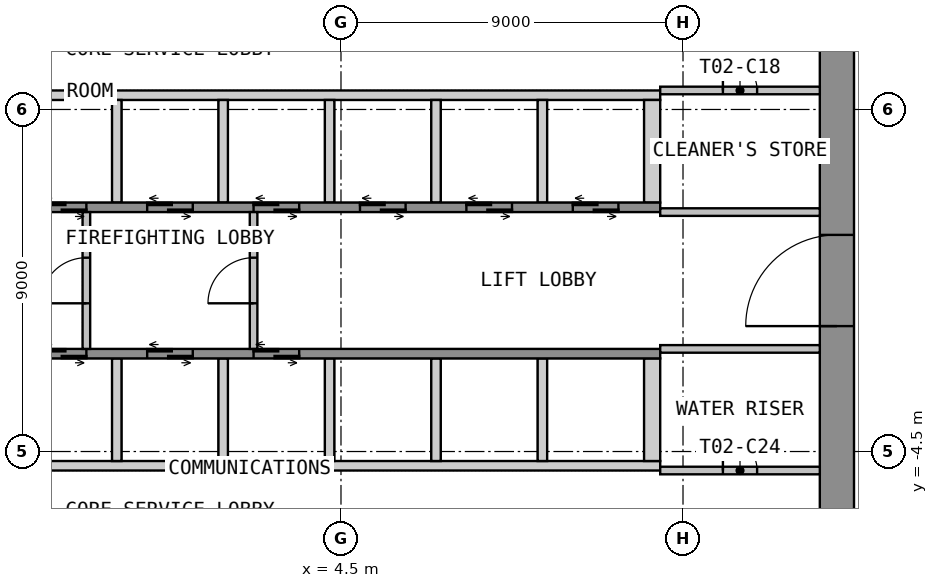
"""IFC4 building model, lengths in metres.
Left out: names, types, materials, properties, quantities, classifications, styles, units other than length and angle.
Written with IfcOpenShell. Run it as: python <this file> out.ifc"""

import sys

from ifc_helpers import new_model, si_unit, direction, frame, frame_2d, origin, place, context, subcontext, project, spatial, polyline, rectangle, outline, extrude, element, fill, save


model = new_model("IFC4")
c1 = context("Model", 3, precision=1e-05, world=origin(), true_north=direction((0.0, 1.0)))
c2 = subcontext(c1, "Body", "Model", "MODEL_VIEW")
j1 = project(units=[si_unit("LENGTHUNIT", "METRE"), si_unit("PLANEANGLEUNIT", "RADIAN")], contexts=[c1])
p1 = place(None, origin())
s1 = spatial("IfcSite", under=j1, at=p1, CompositionType="ELEMENT")
p2 = place(p1, origin())
s2 = spatial("IfcBuilding", under=s1, at=p2, CompositionType="ELEMENT")
p3 = place(p2, frame((0.0, 0.0, 41.7)))
s3 = spatial("IfcBuildingStorey", under=s2, at=p3, CompositionType="ELEMENT", Elevation=41.7)
p4 = place(p3, frame((17.55, -12.6, 0.0), z_axis=(0.0, 0.0, 1.0), x_axis=(0.0, 1.0, 0.0)))
e1 = element("IfcWall", 1, at=p4, inside=s3, PredefinedType="SHEAR", context=c2, shape_type="SweptSolid", body=[
    extrude(rectangle(XDim=25.2, YDim=0.9, at=frame_2d((12.6, 0.0))), origin(), (0.0, 0.0, 1.0), 3.525),
])
p5 = place(p4, frame((11.4, 0.0, 0.0)))
e2 = element("IfcOpeningElement", 2, at=p5, cuts=e1, PredefinedType="OPENING", context=c2, shape_type="SweptSolid", body=[
    extrude(rectangle(XDim=2.4, YDim=2.1, at=frame_2d((1.2, 1.05))), frame((0.0, 0.46, 0.0), z_axis=(0.0, -1.0, 0.0), x_axis=(1.0, 0.0, 0.0)), (0.0, 0.0, 1.0), 0.92),
])
p6 = place(p3, origin())
e3 = element("IfcWall", 3, at=p6, inside=s3, PredefinedType="SHEAR", context=c2, shape_type="SweptSolid", body=[
    extrude(outline(polyline([(-12.9, 4.75), (12.9, 4.75), (12.9, 5.0), (-12.9, 5.0), (-12.9, 4.75)])), origin(), (0.0, 0.0, 1.0), 3.525),
])
p7 = place(p3, origin())
e4 = element("IfcWall", 4, at=p7, inside=s3, PredefinedType="SHEAR", context=c2, shape_type="SweptSolid", body=[
    extrude(outline(polyline([(-1.525, 2.05), (-1.275, 2.05), (-1.275, 4.75), (-1.525, 4.75), (-1.525, 2.05)])), origin(), (0.0, 0.0, 1.0), 3.525),
])
p8 = place(p3, origin())
e5 = element("IfcWall", 5, at=p8, inside=s3, PredefinedType="SHEAR", context=c2, shape_type="SweptSolid", body=[
    extrude(outline(polyline([(1.275, 2.05), (1.525, 2.05), (1.525, 4.75), (1.275, 4.75), (1.275, 2.05)])), origin(), (0.0, 0.0, 1.0), 3.525),
])
p9 = place(p3, origin())
e6 = element("IfcWall", 6, at=p9, inside=s3, PredefinedType="SHEAR", context=c2, shape_type="SweptSolid", body=[
    extrude(outline(polyline([(4.075, 2.05), (4.325, 2.05), (4.325, 4.75), (4.075, 4.75), (4.075, 2.05)])), origin(), (0.0, 0.0, 1.0), 3.525),
])
p10 = place(p3, origin())
e7 = element("IfcWall", 7, at=p10, inside=s3, PredefinedType="SHEAR", context=c2, shape_type="SweptSolid", body=[
    extrude(outline(polyline([(6.875, 2.05), (7.125, 2.05), (7.125, 4.75), (6.875, 4.75), (6.875, 2.05)])), origin(), (0.0, 0.0, 1.0), 3.525),
])
p11 = place(p3, origin())
e8 = element("IfcWall", 8, at=p11, inside=s3, PredefinedType="SHEAR", context=c2, shape_type="SweptSolid", body=[
    extrude(outline(polyline([(9.675, 2.05), (9.925, 2.05), (9.925, 4.75), (9.675, 4.75), (9.675, 2.05)])), origin(), (0.0, 0.0, 1.0), 3.525),
])
p12 = place(p3, origin())
e9 = element("IfcWall", 9, at=p12, inside=s3, PredefinedType="SHEAR", context=c2, shape_type="SweptSolid", body=[
    extrude(outline(polyline([(12.475, 2.05), (12.9, 2.05), (12.9, 4.75), (12.475, 4.75), (12.475, 2.05)])), origin(), (0.0, 0.0, 1.0), 3.525),
])
p13 = place(p3, frame((-12.9, 1.925, 0.0), z_axis=(0.0, 0.0, 1.0), x_axis=(1.0, 0.0, 0.0)))
e10 = element("IfcWall", 10, at=p13, inside=s3, PredefinedType="SHEAR", context=c2, shape_type="SweptSolid", body=[
    extrude(rectangle(XDim=25.8, YDim=0.25, at=frame_2d((12.9, 0.0))), origin(), (0.0, 0.0, 1.0), 3.525),
])
p14 = place(p13, frame((9.5, 0.0, 0.0)))
e11 = element("IfcOpeningElement", 11, at=p14, cuts=e10, PredefinedType="OPENING", context=c2, shape_type="SweptSolid", body=[
    extrude(rectangle(XDim=1.2, YDim=2.1, at=frame_2d((0.6, 1.05))), frame((0.0, 0.135, 0.0), z_axis=(0.0, -1.0, 0.0), x_axis=(1.0, 0.0, 0.0)), (0.0, 0.0, 1.0), 0.27),
])
p15 = place(p13, frame((12.3, 0.0, 0.0)))
e12 = element("IfcOpeningElement", 12, at=p15, cuts=e10, PredefinedType="OPENING", context=c2, shape_type="SweptSolid", body=[
    extrude(rectangle(XDim=1.2, YDim=2.1, at=frame_2d((0.6, 1.05))), frame((0.0, 0.135, 0.0), z_axis=(0.0, -1.0, 0.0), x_axis=(1.0, 0.0, 0.0)), (0.0, 0.0, 1.0), 0.27),
])
p16 = place(p13, frame((15.1, 0.0, 0.0)))
e13 = element("IfcOpeningElement", 13, at=p16, cuts=e10, PredefinedType="OPENING", context=c2, shape_type="SweptSolid", body=[
    extrude(rectangle(XDim=1.2, YDim=2.1, at=frame_2d((0.6, 1.05))), frame((0.0, 0.135, 0.0), z_axis=(0.0, -1.0, 0.0), x_axis=(1.0, 0.0, 0.0)), (0.0, 0.0, 1.0), 0.27),
])
p17 = place(p13, frame((17.9, 0.0, 0.0)))
e14 = element("IfcOpeningElement", 14, at=p17, cuts=e10, PredefinedType="OPENING", context=c2, shape_type="SweptSolid", body=[
    extrude(rectangle(XDim=1.2, YDim=2.1, at=frame_2d((0.6, 1.05))), frame((0.0, 0.135, 0.0), z_axis=(0.0, -1.0, 0.0), x_axis=(1.0, 0.0, 0.0)), (0.0, 0.0, 1.0), 0.27),
])
p18 = place(p13, frame((20.7, 0.0, 0.0)))
e15 = element("IfcOpeningElement", 15, at=p18, cuts=e10, PredefinedType="OPENING", context=c2, shape_type="SweptSolid", body=[
    extrude(rectangle(XDim=1.2, YDim=2.1, at=frame_2d((0.6, 1.05))), frame((0.0, 0.135, 0.0), z_axis=(0.0, -1.0, 0.0), x_axis=(1.0, 0.0, 0.0)), (0.0, 0.0, 1.0), 0.27),
])
p19 = place(p13, frame((23.5, 0.0, 0.0)))
e16 = element("IfcOpeningElement", 16, at=p19, cuts=e10, PredefinedType="OPENING", context=c2, shape_type="SweptSolid", body=[
    extrude(rectangle(XDim=1.2, YDim=2.1, at=frame_2d((0.6, 1.05))), frame((0.0, 0.135, 0.0), z_axis=(0.0, -1.0, 0.0), x_axis=(1.0, 0.0, 0.0)), (0.0, 0.0, 1.0), 0.27),
])
p20 = place(p3, origin())
e17 = element("IfcWall", 17, at=p20, inside=s3, PredefinedType="SHEAR", context=c2, shape_type="SweptSolid", body=[
    extrude(outline(polyline([(-12.9, -5.0), (12.9, -5.0), (12.9, -4.75), (-12.9, -4.75), (-12.9, -5.0)])), origin(), (0.0, 0.0, 1.0), 3.525),
])
p21 = place(p3, origin())
e18 = element("IfcWall", 18, at=p21, inside=s3, PredefinedType="SHEAR", context=c2, shape_type="SweptSolid", body=[
    extrude(outline(polyline([(-1.525, -4.75), (-1.275, -4.75), (-1.275, -2.05), (-1.525, -2.05), (-1.525, -4.75)])), origin(), (0.0, 0.0, 1.0), 3.525),
])
p22 = place(p3, origin())
e19 = element("IfcWall", 19, at=p22, inside=s3, PredefinedType="SHEAR", context=c2, shape_type="SweptSolid", body=[
    extrude(outline(polyline([(1.275, -4.75), (1.525, -4.75), (1.525, -2.05), (1.275, -2.05), (1.275, -4.75)])), origin(), (0.0, 0.0, 1.0), 3.525),
])
p23 = place(p3, origin())
e20 = element("IfcWall", 20, at=p23, inside=s3, PredefinedType="SHEAR", context=c2, shape_type="SweptSolid", body=[
    extrude(outline(polyline([(4.075, -4.75), (4.325, -4.75), (4.325, -2.05), (4.075, -2.05), (4.075, -4.75)])), origin(), (0.0, 0.0, 1.0), 3.525),
])
p24 = place(p3, origin())
e21 = element("IfcWall", 21, at=p24, inside=s3, PredefinedType="SHEAR", context=c2, shape_type="SweptSolid", body=[
    extrude(outline(polyline([(6.875, -4.75), (7.125, -4.75), (7.125, -2.05), (6.875, -2.05), (6.875, -4.75)])), origin(), (0.0, 0.0, 1.0), 3.525),
])
p25 = place(p3, origin())
e22 = element("IfcWall", 22, at=p25, inside=s3, PredefinedType="SHEAR", context=c2, shape_type="SweptSolid", body=[
    extrude(outline(polyline([(9.675, -4.75), (9.925, -4.75), (9.925, -2.05), (9.675, -2.05), (9.675, -4.75)])), origin(), (0.0, 0.0, 1.0), 3.525),
])
p26 = place(p3, origin())
e23 = element("IfcWall", 23, at=p26, inside=s3, PredefinedType="SHEAR", context=c2, shape_type="SweptSolid", body=[
    extrude(outline(polyline([(12.475, -4.75), (12.9, -4.75), (12.9, -2.05), (12.475, -2.05), (12.475, -4.75)])), origin(), (0.0, 0.0, 1.0), 3.525),
])
p27 = place(p3, frame((-12.9, -1.925, 0.0), z_axis=(0.0, 0.0, 1.0), x_axis=(1.0, 0.0, 0.0)))
e24 = element("IfcWall", 24, at=p27, inside=s3, PredefinedType="SHEAR", context=c2, shape_type="SweptSolid", body=[
    extrude(rectangle(XDim=25.8, YDim=0.25, at=frame_2d((12.9, 0.0))), origin(), (0.0, 0.0, 1.0), 3.525),
])
p28 = place(p27, frame((1.1, 0.0, 0.0)))
e25 = element("IfcOpeningElement", 25, at=p28, cuts=e24, PredefinedType="OPENING", context=c2, shape_type="SweptSolid", body=[
    extrude(rectangle(XDim=1.2, YDim=2.1, at=frame_2d((0.6, 1.05))), frame((0.0, 0.135, 0.0), z_axis=(0.0, -1.0, 0.0), x_axis=(1.0, 0.0, 0.0)), (0.0, 0.0, 1.0), 0.27),
])
p29 = place(p27, frame((3.9, 0.0, 0.0)))
e26 = element("IfcOpeningElement", 26, at=p29, cuts=e24, PredefinedType="OPENING", context=c2, shape_type="SweptSolid", body=[
    extrude(rectangle(XDim=1.2, YDim=2.1, at=frame_2d((0.6, 1.05))), frame((0.0, 0.135, 0.0), z_axis=(0.0, -1.0, 0.0), x_axis=(1.0, 0.0, 0.0)), (0.0, 0.0, 1.0), 0.27),
])
p30 = place(p27, frame((6.7, 0.0, 0.0)))
e27 = element("IfcOpeningElement", 27, at=p30, cuts=e24, PredefinedType="OPENING", context=c2, shape_type="SweptSolid", body=[
    extrude(rectangle(XDim=1.2, YDim=2.1, at=frame_2d((0.6, 1.05))), frame((0.0, 0.135, 0.0), z_axis=(0.0, -1.0, 0.0), x_axis=(1.0, 0.0, 0.0)), (0.0, 0.0, 1.0), 0.27),
])
p31 = place(p27, frame((9.5, 0.0, 0.0)))
e28 = element("IfcOpeningElement", 28, at=p31, cuts=e24, PredefinedType="OPENING", context=c2, shape_type="SweptSolid", body=[
    extrude(rectangle(XDim=1.2, YDim=2.1, at=frame_2d((0.6, 1.05))), frame((0.0, 0.135, 0.0), z_axis=(0.0, -1.0, 0.0), x_axis=(1.0, 0.0, 0.0)), (0.0, 0.0, 1.0), 0.27),
])
p32 = place(p27, frame((12.3, 0.0, 0.0)))
e29 = element("IfcOpeningElement", 29, at=p32, cuts=e24, PredefinedType="OPENING", context=c2, shape_type="SweptSolid", body=[
    extrude(rectangle(XDim=1.2, YDim=2.1, at=frame_2d((0.6, 1.05))), frame((0.0, 0.135, 0.0), z_axis=(0.0, -1.0, 0.0), x_axis=(1.0, 0.0, 0.0)), (0.0, 0.0, 1.0), 0.27),
])
p33 = place(p27, frame((15.1, 0.0, 0.0)))
e30 = element("IfcOpeningElement", 30, at=p33, cuts=e24, PredefinedType="OPENING", context=c2, shape_type="SweptSolid", body=[
    extrude(rectangle(XDim=1.2, YDim=2.1, at=frame_2d((0.6, 1.05))), frame((0.0, 0.135, 0.0), z_axis=(0.0, -1.0, 0.0), x_axis=(1.0, 0.0, 0.0)), (0.0, 0.0, 1.0), 0.27),
])
p34 = place(p3, frame((-2.2, -1.8, 0.0), z_axis=(0.0, 0.0, 1.0), x_axis=(0.0, 1.0, 0.0)))
e31 = element("IfcWall", 31, at=p34, inside=s3, PredefinedType="PARTITIONING", context=c2, shape_type="SweptSolid", body=[
    extrude(rectangle(XDim=3.6, YDim=0.2, at=frame_2d((1.8, 0.0))), origin(), (0.0, 0.0, 1.0), 3.525),
])
p35 = place(p34, frame((1.2, 0.0, 0.0)))
e32 = element("IfcOpeningElement", 32, at=p35, cuts=e31, PredefinedType="OPENING", context=c2, shape_type="SweptSolid", body=[
    extrude(rectangle(XDim=1.2, YDim=2.1, at=frame_2d((0.6, 1.05))), frame((0.0, 0.11, 0.0), z_axis=(0.0, -1.0, 0.0), x_axis=(1.0, 0.0, 0.0)), (0.0, 0.0, 1.0), 0.22),
])
p36 = place(p3, frame((2.2, -1.8, 0.0), z_axis=(0.0, 0.0, 1.0), x_axis=(0.0, 1.0, 0.0)))
e33 = element("IfcWall", 33, at=p36, inside=s3, PredefinedType="PARTITIONING", context=c2, shape_type="SweptSolid", body=[
    extrude(rectangle(XDim=3.6, YDim=0.2, at=frame_2d((1.8, 0.0))), origin(), (0.0, 0.0, 1.0), 3.525),
])
p37 = place(p36, frame((1.2, 0.0, 0.0)))
e34 = element("IfcOpeningElement", 34, at=p37, cuts=e33, PredefinedType="OPENING", context=c2, shape_type="SweptSolid", body=[
    extrude(rectangle(XDim=1.2, YDim=2.1, at=frame_2d((0.6, 1.05))), frame((0.0, 0.11, 0.0), z_axis=(0.0, -1.0, 0.0), x_axis=(1.0, 0.0, 0.0)), (0.0, 0.0, 1.0), 0.22),
])
p38 = place(p3, frame((12.9, 5.0, 0.0), z_axis=(0.0, 0.0, 1.0), x_axis=(1.0, 0.0, 0.0)))
e35 = element("IfcWall", 35, at=p38, inside=s3, PredefinedType="PARTITIONING", context=c2, shape_type="SweptSolid", body=[
    extrude(rectangle(XDim=4.2, YDim=0.2, at=frame_2d((2.1, 0.0))), origin(), (0.0, 0.0, 1.0), 3.525),
])
p39 = place(p38, frame((1.65, 0.0, 0.0)))
e36 = element("IfcOpeningElement", 36, at=p39, cuts=e35, PredefinedType="OPENING", context=c2, shape_type="SweptSolid", body=[
    extrude(rectangle(XDim=0.9, YDim=2.1, at=frame_2d((0.45, 1.05))), frame((0.0, 0.11, 0.0), z_axis=(0.0, -1.0, 0.0), x_axis=(1.0, 0.0, 0.0)), (0.0, 0.0, 1.0), 0.22),
])
p40 = place(p3, frame((12.9, 1.8, 0.0), z_axis=(0.0, 0.0, 1.0), x_axis=(1.0, 0.0, 0.0)))
e37 = element("IfcWall", 37, at=p40, inside=s3, PredefinedType="PARTITIONING", context=c2, shape_type="SweptSolid", body=[
    extrude(rectangle(XDim=4.2, YDim=0.2, at=frame_2d((2.1, 0.0))), origin(), (0.0, 0.0, 1.0), 3.525),
])
p41 = place(p3, frame((12.9, -5.0, 0.0), z_axis=(0.0, 0.0, 1.0), x_axis=(1.0, 0.0, 0.0)))
e38 = element("IfcWall", 38, at=p41, inside=s3, PredefinedType="PARTITIONING", context=c2, shape_type="SweptSolid", body=[
    extrude(rectangle(XDim=4.2, YDim=0.2, at=frame_2d((2.1, 0.0))), origin(), (0.0, 0.0, 1.0), 3.525),
])
p42 = place(p41, frame((1.65, 0.0, 0.0)))
e39 = element("IfcOpeningElement", 39, at=p42, cuts=e38, PredefinedType="OPENING", context=c2, shape_type="SweptSolid", body=[
    extrude(rectangle(XDim=0.9, YDim=2.1, at=frame_2d((0.45, 1.05))), frame((0.0, 0.11, 0.0), z_axis=(0.0, -1.0, 0.0), x_axis=(1.0, 0.0, 0.0)), (0.0, 0.0, 1.0), 0.22),
])
p43 = place(p3, frame((12.9, -1.8, 0.0), z_axis=(0.0, 0.0, 1.0), x_axis=(1.0, 0.0, 0.0)))
e40 = element("IfcWall", 40, at=p43, inside=s3, PredefinedType="PARTITIONING", context=c2, shape_type="SweptSolid", body=[
    extrude(rectangle(XDim=4.2, YDim=0.2, at=frame_2d((2.1, 0.0))), origin(), (0.0, 0.0, 1.0), 3.525),
])
p44 = place(p5, origin())
e41 = element("IfcDoor", 41, at=p44, inside=s3, OperationType="DOUBLE_DOOR_DOUBLE_SWING", PredefinedType="DOOR", context=c2, shape_type="SweptSolid", body=[
    extrude(rectangle(XDim=2.4, YDim=2.1, at=frame_2d((1.2, 1.05))), frame((0.0, 0.025, 0.0), z_axis=(0.0, -1.0, 0.0), x_axis=(1.0, 0.0, 0.0)), (0.0, 0.0, 1.0), 0.05),
])
fill(e2, e41)
p45 = place(p14, origin())
e42 = element("IfcDoor", 42, at=p45, inside=s3, OperationType="DOUBLE_DOOR_SLIDING", PredefinedType="DOOR", context=c2, shape_type="SweptSolid", body=[
    extrude(rectangle(XDim=1.2, YDim=2.1, at=frame_2d((0.6, 1.05))), frame((0.0, 0.025, 0.0), z_axis=(0.0, -1.0, 0.0), x_axis=(1.0, 0.0, 0.0)), (0.0, 0.0, 1.0), 0.05),
])
fill(e11, e42)
p46 = place(p15, origin())
e43 = element("IfcDoor", 43, at=p46, inside=s3, OperationType="DOUBLE_DOOR_SLIDING", PredefinedType="DOOR", context=c2, shape_type="SweptSolid", body=[
    extrude(rectangle(XDim=1.2, YDim=2.1, at=frame_2d((0.6, 1.05))), frame((0.0, 0.025, 0.0), z_axis=(0.0, -1.0, 0.0), x_axis=(1.0, 0.0, 0.0)), (0.0, 0.0, 1.0), 0.05),
])
fill(e12, e43)
p47 = place(p16, origin())
e44 = element("IfcDoor", 44, at=p47, inside=s3, OperationType="DOUBLE_DOOR_SLIDING", PredefinedType="DOOR", context=c2, shape_type="SweptSolid", body=[
    extrude(rectangle(XDim=1.2, YDim=2.1, at=frame_2d((0.6, 1.05))), frame((0.0, 0.025, 0.0), z_axis=(0.0, -1.0, 0.0), x_axis=(1.0, 0.0, 0.0)), (0.0, 0.0, 1.0), 0.05),
])
fill(e13, e44)
p48 = place(p17, origin())
e45 = element("IfcDoor", 45, at=p48, inside=s3, OperationType="DOUBLE_DOOR_SLIDING", PredefinedType="DOOR", context=c2, shape_type="SweptSolid", body=[
    extrude(rectangle(XDim=1.2, YDim=2.1, at=frame_2d((0.6, 1.05))), frame((0.0, 0.025, 0.0), z_axis=(0.0, -1.0, 0.0), x_axis=(1.0, 0.0, 0.0)), (0.0, 0.0, 1.0), 0.05),
])
fill(e14, e45)
p49 = place(p18, origin())
e46 = element("IfcDoor", 46, at=p49, inside=s3, OperationType="DOUBLE_DOOR_SLIDING", PredefinedType="DOOR", context=c2, shape_type="SweptSolid", body=[
    extrude(rectangle(XDim=1.2, YDim=2.1, at=frame_2d((0.6, 1.05))), frame((0.0, 0.025, 0.0), z_axis=(0.0, -1.0, 0.0), x_axis=(1.0, 0.0, 0.0)), (0.0, 0.0, 1.0), 0.05),
])
fill(e15, e46)
p50 = place(p19, origin())
e47 = element("IfcDoor", 47, at=p50, inside=s3, OperationType="DOUBLE_DOOR_SLIDING", PredefinedType="DOOR", context=c2, shape_type="SweptSolid", body=[
    extrude(rectangle(XDim=1.2, YDim=2.1, at=frame_2d((0.6, 1.05))), frame((0.0, 0.025, 0.0), z_axis=(0.0, -1.0, 0.0), x_axis=(1.0, 0.0, 0.0)), (0.0, 0.0, 1.0), 0.05),
])
fill(e16, e47)
p51 = place(p31, origin())
e48 = element("IfcDoor", 48, at=p51, inside=s3, OperationType="DOUBLE_DOOR_SLIDING", PredefinedType="DOOR", context=c2, shape_type="SweptSolid", body=[
    extrude(rectangle(XDim=1.2, YDim=2.1, at=frame_2d((0.6, 1.05))), frame((0.0, 0.025, 0.0), z_axis=(0.0, -1.0, 0.0), x_axis=(1.0, 0.0, 0.0)), (0.0, 0.0, 1.0), 0.05),
])
fill(e28, e48)
p52 = place(p32, origin())
e49 = element("IfcDoor", 49, at=p52, inside=s3, OperationType="DOUBLE_DOOR_SLIDING", PredefinedType="DOOR", context=c2, shape_type="SweptSolid", body=[
    extrude(rectangle(XDim=1.2, YDim=2.1, at=frame_2d((0.6, 1.05))), frame((0.0, 0.025, 0.0), z_axis=(0.0, -1.0, 0.0), x_axis=(1.0, 0.0, 0.0)), (0.0, 0.0, 1.0), 0.05),
])
fill(e29, e49)
p53 = place(p33, origin())
e50 = element("IfcDoor", 50, at=p53, inside=s3, OperationType="DOUBLE_DOOR_SLIDING", PredefinedType="DOOR", context=c2, shape_type="SweptSolid", body=[
    extrude(rectangle(XDim=1.2, YDim=2.1, at=frame_2d((0.6, 1.05))), frame((0.0, 0.025, 0.0), z_axis=(0.0, -1.0, 0.0), x_axis=(1.0, 0.0, 0.0)), (0.0, 0.0, 1.0), 0.05),
])
fill(e30, e50)
p54 = place(p35, origin())
e51 = element("IfcDoor", 51, at=p54, inside=s3, OperationType="SINGLE_SWING_LEFT", PredefinedType="DOOR", context=c2, shape_type="SweptSolid", body=[
    extrude(rectangle(XDim=1.2, YDim=2.1, at=frame_2d((0.6, 1.05))), frame((0.0, 0.025, 0.0), z_axis=(0.0, -1.0, 0.0), x_axis=(1.0, 0.0, 0.0)), (0.0, 0.0, 1.0), 0.05),
])
fill(e32, e51)
p55 = place(p37, origin())
e52 = element("IfcDoor", 52, at=p55, inside=s3, OperationType="SINGLE_SWING_LEFT", PredefinedType="DOOR", context=c2, shape_type="SweptSolid", body=[
    extrude(rectangle(XDim=1.2, YDim=2.1, at=frame_2d((0.6, 1.05))), frame((0.0, 0.025, 0.0), z_axis=(0.0, -1.0, 0.0), x_axis=(1.0, 0.0, 0.0)), (0.0, 0.0, 1.0), 0.05),
])
fill(e34, e52)
p56 = place(p39, origin())
e53 = element("IfcDoor", 53, at=p56, inside=s3, OperationType="SINGLE_SWING_LEFT", PredefinedType="DOOR", context=c2, shape_type="SweptSolid", body=[
    extrude(rectangle(XDim=0.9, YDim=2.1, at=frame_2d((0.45, 1.05))), frame((0.0, 0.025, 0.0), z_axis=(0.0, -1.0, 0.0), x_axis=(1.0, 0.0, 0.0)), (0.0, 0.0, 1.0), 0.05),
])
fill(e36, e53)
p57 = place(p42, origin())
e54 = element("IfcDoor", 54, at=p57, inside=s3, OperationType="SINGLE_SWING_LEFT", PredefinedType="DOOR", context=c2, shape_type="SweptSolid", body=[
    extrude(rectangle(XDim=0.9, YDim=2.1, at=frame_2d((0.45, 1.05))), frame((0.0, 0.025, 0.0), z_axis=(0.0, -1.0, 0.0), x_axis=(1.0, 0.0, 0.0)), (0.0, 0.0, 1.0), 0.05),
])
fill(e39, e54)
save(model, sys.argv[1])
